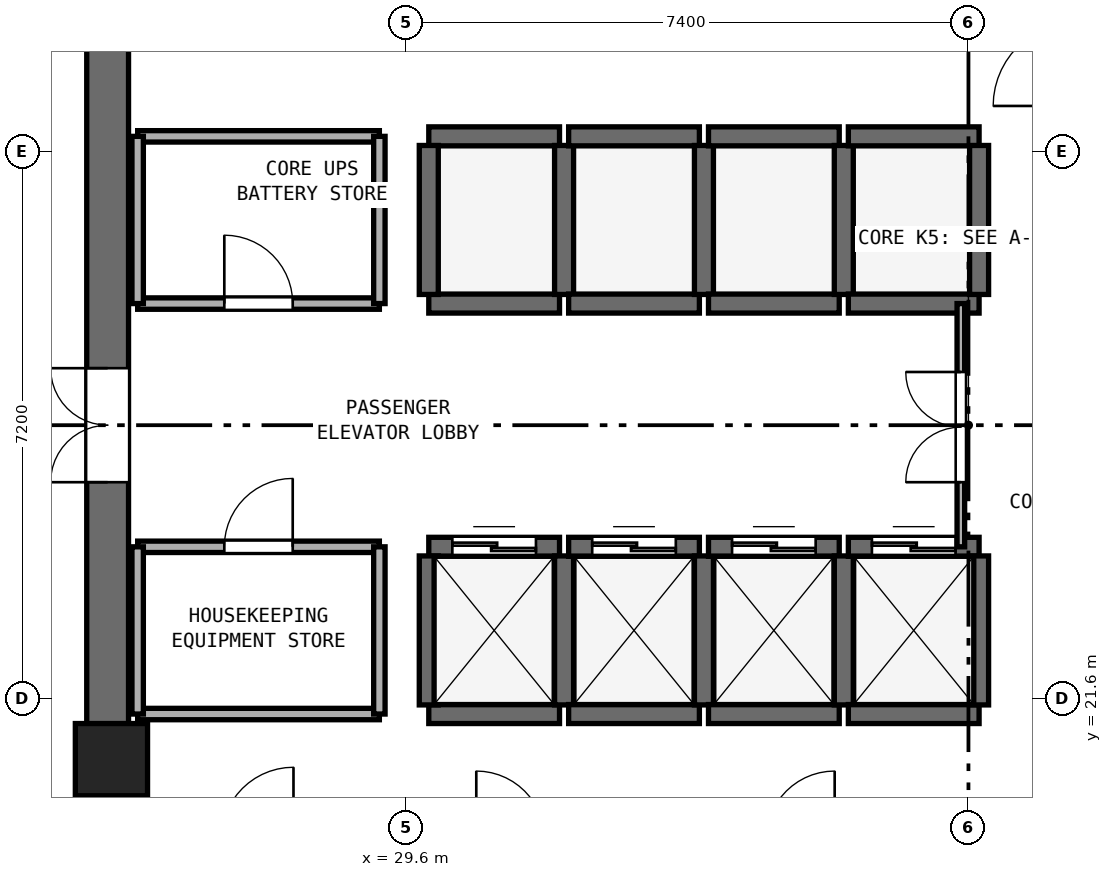
"""IFC4 building model, lengths in metres.
Left out: names, types, materials, properties, quantities, classifications, styles, units other than length and angle.
Written with IfcOpenShell. Run it as: python <this file> out.ifc"""

import sys

from ifc_helpers import new_model, si_unit, direction, frame, frame_2d, origin, origin_2d, place, context, subcontext, project, spatial, rectangle, extrude, element, fill, save


model = new_model("IFC4")
c1 = context("Model", 3, precision=1e-05, world=origin(), true_north=direction((0.0, 1.0)))
c2 = subcontext(c1, "Body", "Model", "MODEL_VIEW")
j1 = project(units=[si_unit("LENGTHUNIT", "METRE"), si_unit("PLANEANGLEUNIT", "RADIAN")], contexts=[c1])
p1 = place(None, origin())
s1 = spatial("IfcSite", under=j1, at=p1, CompositionType="ELEMENT")
p2 = place(p1, origin())
s2 = spatial("IfcBuilding", under=s1, at=p2, CompositionType="ELEMENT")
p3 = place(p2, frame((0.0, 0.0, 159.2)))
s3 = spatial("IfcBuildingStorey", under=s2, at=p3, CompositionType="ELEMENT", Elevation=159.2)
p4 = place(p3, frame((25.675, 17.55, 0.0), z_axis=(0.0, 0.0, 1.0), x_axis=(0.0, 1.0, 0.0)))
e1 = element("IfcWall", 1, at=p4, inside=s3, PredefinedType="SHEAR", context=c2, shape_type="SweptSolid", body=[
    extrude(rectangle(XDim=15.3, YDim=0.55, at=frame_2d((7.65, 0.0))), origin(), (0.0, 0.0, 1.0), 3.54),
])
p5 = place(p4, frame((6.9, 0.0, 0.0)))
e2 = element("IfcOpeningElement", 2, at=p5, cuts=e1, PredefinedType="OPENING", context=c2, shape_type="SweptSolid", body=[
    extrude(rectangle(XDim=1.5, YDim=2.15, at=frame_2d((0.75, 1.075))), frame((0.0, 0.285, 0.0), z_axis=(0.0, -1.0, 0.0), x_axis=(1.0, 0.0, 0.0)), (0.0, 0.0, 1.0), 0.57),
])
p6 = place(p3, frame((25.725, 20.8, 0.0), z_axis=(0.0, 0.0, 1.0), x_axis=(1.0, 0.0, 0.0)))
e3 = element("IfcColumn", 3, at=p6, inside=s3, PredefinedType="PILASTER", context=c2, shape_type="SweptSolid", body=[
    extrude(rectangle(XDim=0.95, YDim=0.95, at=origin_2d()), origin(), (0.0, 0.0, 1.0), 3.8),
])
p7 = place(p3, frame((29.9, 21.4, 0.0), z_axis=(0.0, 0.0, 1.0), x_axis=(1.0, 0.0, 0.0)))
e4 = element("IfcWall", 4, at=p7, inside=s3, PredefinedType="SHEAR", context=c2, shape_type="SweptSolid", body=[
    extrude(rectangle(XDim=1.72, YDim=0.25, at=frame_2d((0.86, 0.0))), origin(), (0.0, 0.0, 1.0), 3.54),
])
p8 = place(p3, frame((29.9, 23.6, 0.0), z_axis=(0.0, 0.0, 1.0), x_axis=(1.0, 0.0, 0.0)))
e5 = element("IfcWall", 5, at=p8, inside=s3, PredefinedType="SHEAR", context=c2, shape_type="SweptSolid", body=[
    extrude(rectangle(XDim=1.72, YDim=0.25, at=frame_2d((0.86, 0.0))), origin(), (0.0, 0.0, 1.0), 3.54),
])
p9 = place(p8, frame((0.31, 0.0, 0.0)))
e6 = element("IfcOpeningElement", 6, at=p9, cuts=e5, PredefinedType="OPENING", context=c2, shape_type="SweptSolid", body=[
    extrude(rectangle(XDim=1.1, YDim=2.15, at=frame_2d((0.55, 1.075))), frame((0.0, 0.135, 0.0), z_axis=(0.0, -1.0, 0.0), x_axis=(1.0, 0.0, 0.0)), (0.0, 0.0, 1.0), 0.27),
])
for number, where, z_axis, x_axis in (
    (7, (29.9, 21.52, 0.0), (0.0, 0.0, 1.0), (0.0, 1.0, 0.0)),
    (8, (31.68, 21.52, 0.0), (0.0, 0.0, 1.0), (0.0, 1.0, 0.0)),
):
    element("IfcWall", number, at=place(p3, frame(where, z_axis=z_axis, x_axis=x_axis)), inside=s3, PredefinedType="SHEAR", context=c2, shape_type="SweptSolid", body=[
        extrude(rectangle(XDim=1.96, YDim=0.25, at=frame_2d((0.98, 0.0))), origin(), (0.0, 0.0, 1.0), 3.54),
    ])
p10 = place(p3, frame((31.74, 21.4, 0.0), z_axis=(0.0, 0.0, 1.0), x_axis=(1.0, 0.0, 0.0)))
e9 = element("IfcWall", 9, at=p10, inside=s3, PredefinedType="SHEAR", context=c2, shape_type="SweptSolid", body=[
    extrude(rectangle(XDim=1.72, YDim=0.25, at=frame_2d((0.86, 0.0))), origin(), (0.0, 0.0, 1.0), 3.54),
])
p11 = place(p3, frame((31.74, 23.6, 0.0), z_axis=(0.0, 0.0, 1.0), x_axis=(1.0, 0.0, 0.0)))
e10 = element("IfcWall", 10, at=p11, inside=s3, PredefinedType="SHEAR", context=c2, shape_type="SweptSolid", body=[
    extrude(rectangle(XDim=1.72, YDim=0.25, at=frame_2d((0.86, 0.0))), origin(), (0.0, 0.0, 1.0), 3.54),
])
p12 = place(p11, frame((0.31, 0.0, 0.0)))
e11 = element("IfcOpeningElement", 11, at=p12, cuts=e10, PredefinedType="OPENING", context=c2, shape_type="SweptSolid", body=[
    extrude(rectangle(XDim=1.1, YDim=2.15, at=frame_2d((0.55, 1.075))), frame((0.0, 0.135, 0.0), z_axis=(0.0, -1.0, 0.0), x_axis=(1.0, 0.0, 0.0)), (0.0, 0.0, 1.0), 0.27),
])
p13 = place(p3, frame((33.52, 21.52, 0.0), z_axis=(0.0, 0.0, 1.0), x_axis=(0.0, 1.0, 0.0)))
e12 = element("IfcWall", 12, at=p13, inside=s3, PredefinedType="SHEAR", context=c2, shape_type="SweptSolid", body=[
    extrude(rectangle(XDim=1.96, YDim=0.25, at=frame_2d((0.98, 0.0))), origin(), (0.0, 0.0, 1.0), 3.54),
])
p14 = place(p3, frame((33.58, 21.4, 0.0), z_axis=(0.0, 0.0, 1.0), x_axis=(1.0, 0.0, 0.0)))
e13 = element("IfcWall", 13, at=p14, inside=s3, PredefinedType="SHEAR", context=c2, shape_type="SweptSolid", body=[
    extrude(rectangle(XDim=1.72, YDim=0.25, at=frame_2d((0.86, 0.0))), origin(), (0.0, 0.0, 1.0), 3.54),
])
p15 = place(p3, frame((33.58, 23.6, 0.0), z_axis=(0.0, 0.0, 1.0), x_axis=(1.0, 0.0, 0.0)))
e14 = element("IfcWall", 14, at=p15, inside=s3, PredefinedType="SHEAR", context=c2, shape_type="SweptSolid", body=[
    extrude(rectangle(XDim=1.72, YDim=0.25, at=frame_2d((0.86, 0.0))), origin(), (0.0, 0.0, 1.0), 3.54),
])
p16 = place(p15, frame((0.31, 0.0, 0.0)))
e15 = element("IfcOpeningElement", 15, at=p16, cuts=e14, PredefinedType="OPENING", context=c2, shape_type="SweptSolid", body=[
    extrude(rectangle(XDim=1.1, YDim=2.15, at=frame_2d((0.55, 1.075))), frame((0.0, 0.135, 0.0), z_axis=(0.0, -1.0, 0.0), x_axis=(1.0, 0.0, 0.0)), (0.0, 0.0, 1.0), 0.27),
])
p17 = place(p3, frame((35.36, 21.52, 0.0), z_axis=(0.0, 0.0, 1.0), x_axis=(0.0, 1.0, 0.0)))
e16 = element("IfcWall", 16, at=p17, inside=s3, PredefinedType="SHEAR", context=c2, shape_type="SweptSolid", body=[
    extrude(rectangle(XDim=1.96, YDim=0.25, at=frame_2d((0.98, 0.0))), origin(), (0.0, 0.0, 1.0), 3.54),
])
p18 = place(p3, frame((35.42, 21.4, 0.0), z_axis=(0.0, 0.0, 1.0), x_axis=(1.0, 0.0, 0.0)))
e17 = element("IfcWall", 17, at=p18, inside=s3, PredefinedType="SHEAR", context=c2, shape_type="SweptSolid", body=[
    extrude(rectangle(XDim=1.72, YDim=0.25, at=frame_2d((0.86, 0.0))), origin(), (0.0, 0.0, 1.0), 3.54),
])
p19 = place(p3, frame((35.42, 23.6, 0.0), z_axis=(0.0, 0.0, 1.0), x_axis=(1.0, 0.0, 0.0)))
e18 = element("IfcWall", 18, at=p19, inside=s3, PredefinedType="SHEAR", context=c2, shape_type="SweptSolid", body=[
    extrude(rectangle(XDim=1.72, YDim=0.25, at=frame_2d((0.86, 0.0))), origin(), (0.0, 0.0, 1.0), 3.54),
])
p20 = place(p19, frame((0.31, 0.0, 0.0)))
e19 = element("IfcOpeningElement", 19, at=p20, cuts=e18, PredefinedType="OPENING", context=c2, shape_type="SweptSolid", body=[
    extrude(rectangle(XDim=1.1, YDim=2.15, at=frame_2d((0.55, 1.075))), frame((0.0, 0.135, 0.0), z_axis=(0.0, -1.0, 0.0), x_axis=(1.0, 0.0, 0.0)), (0.0, 0.0, 1.0), 0.27),
])
p21 = place(p3, frame((37.14, 21.52, 0.0), z_axis=(0.0, 0.0, 1.0), x_axis=(0.0, 1.0, 0.0)))
e20 = element("IfcWall", 20, at=p21, inside=s3, PredefinedType="SHEAR", context=c2, shape_type="SweptSolid", body=[
    extrude(rectangle(XDim=1.96, YDim=0.25, at=frame_2d((0.98, 0.0))), origin(), (0.0, 0.0, 1.0), 3.54),
])
for number, where, z_axis, x_axis in (
    (21, (29.9, 26.8, 0.0), (0.0, 0.0, 1.0), (1.0, 0.0, 0.0)),
    (22, (29.9, 29.0, 0.0), (0.0, 0.0, 1.0), (1.0, 0.0, 0.0)),
):
    element("IfcWall", number, at=place(p3, frame(where, z_axis=z_axis, x_axis=x_axis)), inside=s3, PredefinedType="SHEAR", context=c2, shape_type="SweptSolid", body=[
        extrude(rectangle(XDim=1.72, YDim=0.25, at=frame_2d((0.86, 0.0))), origin(), (0.0, 0.0, 1.0), 3.54),
    ])
for number, where, z_axis, x_axis in (
    (23, (29.9, 26.92, 0.0), (0.0, 0.0, 1.0), (0.0, 1.0, 0.0)),
    (24, (31.68, 26.92, 0.0), (0.0, 0.0, 1.0), (0.0, 1.0, 0.0)),
):
    element("IfcWall", number, at=place(p3, frame(where, z_axis=z_axis, x_axis=x_axis)), inside=s3, PredefinedType="SHEAR", context=c2, shape_type="SweptSolid", body=[
        extrude(rectangle(XDim=1.96, YDim=0.25, at=frame_2d((0.98, 0.0))), origin(), (0.0, 0.0, 1.0), 3.54),
    ])
for number, where, z_axis, x_axis in (
    (25, (31.74, 26.8, 0.0), (0.0, 0.0, 1.0), (1.0, 0.0, 0.0)),
    (26, (31.74, 29.0, 0.0), (0.0, 0.0, 1.0), (1.0, 0.0, 0.0)),
):
    element("IfcWall", number, at=place(p3, frame(where, z_axis=z_axis, x_axis=x_axis)), inside=s3, PredefinedType="SHEAR", context=c2, shape_type="SweptSolid", body=[
        extrude(rectangle(XDim=1.72, YDim=0.25, at=frame_2d((0.86, 0.0))), origin(), (0.0, 0.0, 1.0), 3.54),
    ])
p22 = place(p3, frame((33.52, 26.92, 0.0), z_axis=(0.0, 0.0, 1.0), x_axis=(0.0, 1.0, 0.0)))
e27 = element("IfcWall", 27, at=p22, inside=s3, PredefinedType="SHEAR", context=c2, shape_type="SweptSolid", body=[
    extrude(rectangle(XDim=1.96, YDim=0.25, at=frame_2d((0.98, 0.0))), origin(), (0.0, 0.0, 1.0), 3.54),
])
for number, where, z_axis, x_axis in (
    (28, (33.58, 26.8, 0.0), (0.0, 0.0, 1.0), (1.0, 0.0, 0.0)),
    (29, (33.58, 29.0, 0.0), (0.0, 0.0, 1.0), (1.0, 0.0, 0.0)),
):
    element("IfcWall", number, at=place(p3, frame(where, z_axis=z_axis, x_axis=x_axis)), inside=s3, PredefinedType="SHEAR", context=c2, shape_type="SweptSolid", body=[
        extrude(rectangle(XDim=1.72, YDim=0.25, at=frame_2d((0.86, 0.0))), origin(), (0.0, 0.0, 1.0), 3.54),
    ])
p23 = place(p3, frame((35.36, 26.92, 0.0), z_axis=(0.0, 0.0, 1.0), x_axis=(0.0, 1.0, 0.0)))
e30 = element("IfcWall", 30, at=p23, inside=s3, PredefinedType="SHEAR", context=c2, shape_type="SweptSolid", body=[
    extrude(rectangle(XDim=1.96, YDim=0.25, at=frame_2d((0.98, 0.0))), origin(), (0.0, 0.0, 1.0), 3.54),
])
for number, where, z_axis, x_axis in (
    (31, (35.42, 26.8, 0.0), (0.0, 0.0, 1.0), (1.0, 0.0, 0.0)),
    (32, (35.42, 29.0, 0.0), (0.0, 0.0, 1.0), (1.0, 0.0, 0.0)),
):
    element("IfcWall", number, at=place(p3, frame(where, z_axis=z_axis, x_axis=x_axis)), inside=s3, PredefinedType="SHEAR", context=c2, shape_type="SweptSolid", body=[
        extrude(rectangle(XDim=1.72, YDim=0.25, at=frame_2d((0.86, 0.0))), origin(), (0.0, 0.0, 1.0), 3.54),
    ])
p24 = place(p3, frame((37.14, 26.92, 0.0), z_axis=(0.0, 0.0, 1.0), x_axis=(0.0, 1.0, 0.0)))
e33 = element("IfcWall", 33, at=p24, inside=s3, PredefinedType="SHEAR", context=c2, shape_type="SweptSolid", body=[
    extrude(rectangle(XDim=1.96, YDim=0.25, at=frame_2d((0.98, 0.0))), origin(), (0.0, 0.0, 1.0), 3.54),
])
p25 = place(p3, frame((26.07, 26.8, 0.0), z_axis=(0.0, 0.0, 1.0), x_axis=(1.0, 0.0, 0.0)))
e34 = element("IfcWall", 34, at=p25, inside=s3, PredefinedType="PARTITIONING", context=c2, shape_type="SweptSolid", body=[
    extrude(rectangle(XDim=3.18, YDim=0.15, at=frame_2d((1.59, 0.0))), origin(), (0.0, 0.0, 1.0), 3.54),
])
p26 = place(p25, frame((1.14, 0.0, 0.0)))
e35 = element("IfcOpeningElement", 35, at=p26, cuts=e34, PredefinedType="OPENING", context=c2, shape_type="SweptSolid", body=[
    extrude(rectangle(XDim=0.9, YDim=2.1, at=frame_2d((0.45, 1.05))), frame((0.0, 0.085, 0.0), z_axis=(0.0, -1.0, 0.0), x_axis=(1.0, 0.0, 0.0)), (0.0, 0.0, 1.0), 0.17),
])
p27 = place(p3, frame((26.07, 29.0, 0.0), z_axis=(0.0, 0.0, 1.0), x_axis=(1.0, 0.0, 0.0)))
e36 = element("IfcWall", 36, at=p27, inside=s3, PredefinedType="PARTITIONING", context=c2, shape_type="SweptSolid", body=[
    extrude(rectangle(XDim=3.18, YDim=0.15, at=frame_2d((1.59, 0.0))), origin(), (0.0, 0.0, 1.0), 3.54),
])
p28 = place(p3, frame((26.07, 26.8, 0.0), z_axis=(0.0, 0.0, 1.0), x_axis=(0.0, 1.0, 0.0)))
e37 = element("IfcWall", 37, at=p28, inside=s3, PredefinedType="PARTITIONING", context=c2, shape_type="SweptSolid", body=[
    extrude(rectangle(XDim=2.2, YDim=0.15, at=frame_2d((1.1, 0.0))), origin(), (0.0, 0.0, 1.0), 2.64),
])
p29 = place(p3, frame((29.25, 26.8, 0.0), z_axis=(0.0, 0.0, 1.0), x_axis=(0.0, 1.0, 0.0)))
e38 = element("IfcWall", 38, at=p29, inside=s3, PredefinedType="PARTITIONING", context=c2, shape_type="SweptSolid", body=[
    extrude(rectangle(XDim=2.2, YDim=0.15, at=frame_2d((1.1, 0.0))), origin(), (0.0, 0.0, 1.0), 3.54),
])
p30 = place(p3, frame((26.07, 21.4, 0.0), z_axis=(0.0, 0.0, 1.0), x_axis=(1.0, 0.0, 0.0)))
e39 = element("IfcWall", 39, at=p30, inside=s3, PredefinedType="PARTITIONING", context=c2, shape_type="SweptSolid", body=[
    extrude(rectangle(XDim=3.18, YDim=0.15, at=frame_2d((1.59, 0.0))), origin(), (0.0, 0.0, 1.0), 3.54),
])
p31 = place(p3, frame((26.07, 23.6, 0.0), z_axis=(0.0, 0.0, 1.0), x_axis=(1.0, 0.0, 0.0)))
e40 = element("IfcWall", 40, at=p31, inside=s3, PredefinedType="PARTITIONING", context=c2, shape_type="SweptSolid", body=[
    extrude(rectangle(XDim=3.18, YDim=0.15, at=frame_2d((1.59, 0.0))), origin(), (0.0, 0.0, 1.0), 3.54),
])
p32 = place(p31, frame((1.14, 0.0, 0.0)))
e41 = element("IfcOpeningElement", 41, at=p32, cuts=e40, PredefinedType="OPENING", context=c2, shape_type="SweptSolid", body=[
    extrude(rectangle(XDim=0.9, YDim=2.1, at=frame_2d((0.45, 1.05))), frame((0.0, 0.085, 0.0), z_axis=(0.0, -1.0, 0.0), x_axis=(1.0, 0.0, 0.0)), (0.0, 0.0, 1.0), 0.17),
])
p33 = place(p3, frame((26.07, 21.4, 0.0), z_axis=(0.0, 0.0, 1.0), x_axis=(0.0, 1.0, 0.0)))
e42 = element("IfcWall", 42, at=p33, inside=s3, PredefinedType="PARTITIONING", context=c2, shape_type="SweptSolid", body=[
    extrude(rectangle(XDim=2.2, YDim=0.15, at=frame_2d((1.1, 0.0))), origin(), (0.0, 0.0, 1.0), 2.64),
])
p34 = place(p3, frame((29.25, 21.4, 0.0), z_axis=(0.0, 0.0, 1.0), x_axis=(0.0, 1.0, 0.0)))
e43 = element("IfcWall", 43, at=p34, inside=s3, PredefinedType="PARTITIONING", context=c2, shape_type="SweptSolid", body=[
    extrude(rectangle(XDim=2.2, YDim=0.15, at=frame_2d((1.1, 0.0))), origin(), (0.0, 0.0, 1.0), 3.54),
])
p35 = place(p3, frame((36.9, 23.6, 0.0), z_axis=(0.0, 0.0, 1.0), x_axis=(0.0, 1.0, 0.0)))
e44 = element("IfcWall", 44, at=p35, inside=s3, PredefinedType="PARTITIONING", context=c2, shape_type="SweptSolid", body=[
    extrude(rectangle(XDim=3.2, YDim=0.1, at=frame_2d((1.6, 0.0))), origin(), (0.0, 0.0, 1.0), 3.54),
])
p36 = place(p35, frame((0.85, 0.0, 0.0)))
e45 = element("IfcOpeningElement", 45, at=p36, cuts=e44, PredefinedType="OPENING", context=c2, shape_type="SweptSolid", body=[
    extrude(rectangle(XDim=1.45, YDim=2.12, at=frame_2d((0.725, 1.06))), frame((0.0, 0.06, 0.0), z_axis=(0.0, -1.0, 0.0), x_axis=(1.0, 0.0, 0.0)), (0.0, 0.0, 1.0), 0.12),
])
p37 = place(p9, origin())
e46 = element("IfcDoor", 46, at=p37, inside=s3, OperationType="DOUBLE_DOOR_SLIDING", PredefinedType="DOOR", context=c2, shape_type="SweptSolid", body=[
    extrude(rectangle(XDim=1.1, YDim=2.15, at=frame_2d((0.55, 1.075))), frame((0.0, 0.025, 0.0), z_axis=(0.0, -1.0, 0.0), x_axis=(1.0, 0.0, 0.0)), (0.0, 0.0, 1.0), 0.05),
])
fill(e6, e46)
p38 = place(p12, origin())
e47 = element("IfcDoor", 47, at=p38, inside=s3, OperationType="DOUBLE_DOOR_SLIDING", PredefinedType="DOOR", context=c2, shape_type="SweptSolid", body=[
    extrude(rectangle(XDim=1.1, YDim=2.15, at=frame_2d((0.55, 1.075))), frame((0.0, 0.025, 0.0), z_axis=(0.0, -1.0, 0.0), x_axis=(1.0, 0.0, 0.0)), (0.0, 0.0, 1.0), 0.05),
])
fill(e11, e47)
p39 = place(p16, origin())
e48 = element("IfcDoor", 48, at=p39, inside=s3, OperationType="DOUBLE_DOOR_SLIDING", PredefinedType="DOOR", context=c2, shape_type="SweptSolid", body=[
    extrude(rectangle(XDim=1.1, YDim=2.15, at=frame_2d((0.55, 1.075))), frame((0.0, 0.025, 0.0), z_axis=(0.0, -1.0, 0.0), x_axis=(1.0, 0.0, 0.0)), (0.0, 0.0, 1.0), 0.05),
])
fill(e15, e48)
p40 = place(p20, origin())
e49 = element("IfcDoor", 49, at=p40, inside=s3, OperationType="DOUBLE_DOOR_SLIDING", PredefinedType="DOOR", context=c2, shape_type="SweptSolid", body=[
    extrude(rectangle(XDim=1.1, YDim=2.15, at=frame_2d((0.55, 1.075))), frame((0.0, 0.025, 0.0), z_axis=(0.0, -1.0, 0.0), x_axis=(1.0, 0.0, 0.0)), (0.0, 0.0, 1.0), 0.05),
])
fill(e19, e49)
p41 = place(p5, origin())
e50 = element("IfcDoor", 50, at=p41, inside=s3, OperationType="DOUBLE_DOOR_SINGLE_SWING", PredefinedType="DOOR", context=c2, shape_type="SweptSolid", body=[
    extrude(rectangle(XDim=1.5, YDim=2.15, at=frame_2d((0.75, 1.075))), frame((0.0, 0.025, 0.0), z_axis=(0.0, -1.0, 0.0), x_axis=(1.0, 0.0, 0.0)), (0.0, 0.0, 1.0), 0.05),
])
fill(e2, e50)
p42 = place(p26, origin())
e51 = element("IfcDoor", 51, at=p42, inside=s3, OperationType="SINGLE_SWING_LEFT", PredefinedType="DOOR", context=c2, shape_type="SweptSolid", body=[
    extrude(rectangle(XDim=0.9, YDim=2.1, at=frame_2d((0.45, 1.05))), frame((0.0, 0.025, 0.0), z_axis=(0.0, -1.0, 0.0), x_axis=(1.0, 0.0, 0.0)), (0.0, 0.0, 1.0), 0.05),
])
fill(e35, e51)
p43 = place(p32, origin())
e52 = element("IfcDoor", 52, at=p43, inside=s3, OperationType="SINGLE_SWING_RIGHT", PredefinedType="DOOR", context=c2, shape_type="SweptSolid", body=[
    extrude(rectangle(XDim=0.9, YDim=2.1, at=frame_2d((0.45, 1.05))), frame((0.0, 0.025, 0.0), z_axis=(0.0, -1.0, 0.0), x_axis=(1.0, 0.0, 0.0)), (0.0, 0.0, 1.0), 0.05),
])
fill(e41, e52)
p44 = place(p36, origin())
e53 = element("IfcDoor", 53, at=p44, inside=s3, OperationType="DOUBLE_DOOR_SINGLE_SWING", PredefinedType="DOOR", context=c2, shape_type="SweptSolid", body=[
    extrude(rectangle(XDim=1.45, YDim=2.12, at=frame_2d((0.725, 1.06))), frame((0.0, 0.025, 0.0), z_axis=(0.0, -1.0, 0.0), x_axis=(1.0, 0.0, 0.0)), (0.0, 0.0, 1.0), 0.05),
])
fill(e45, e53)
save(model, sys.argv[1])
